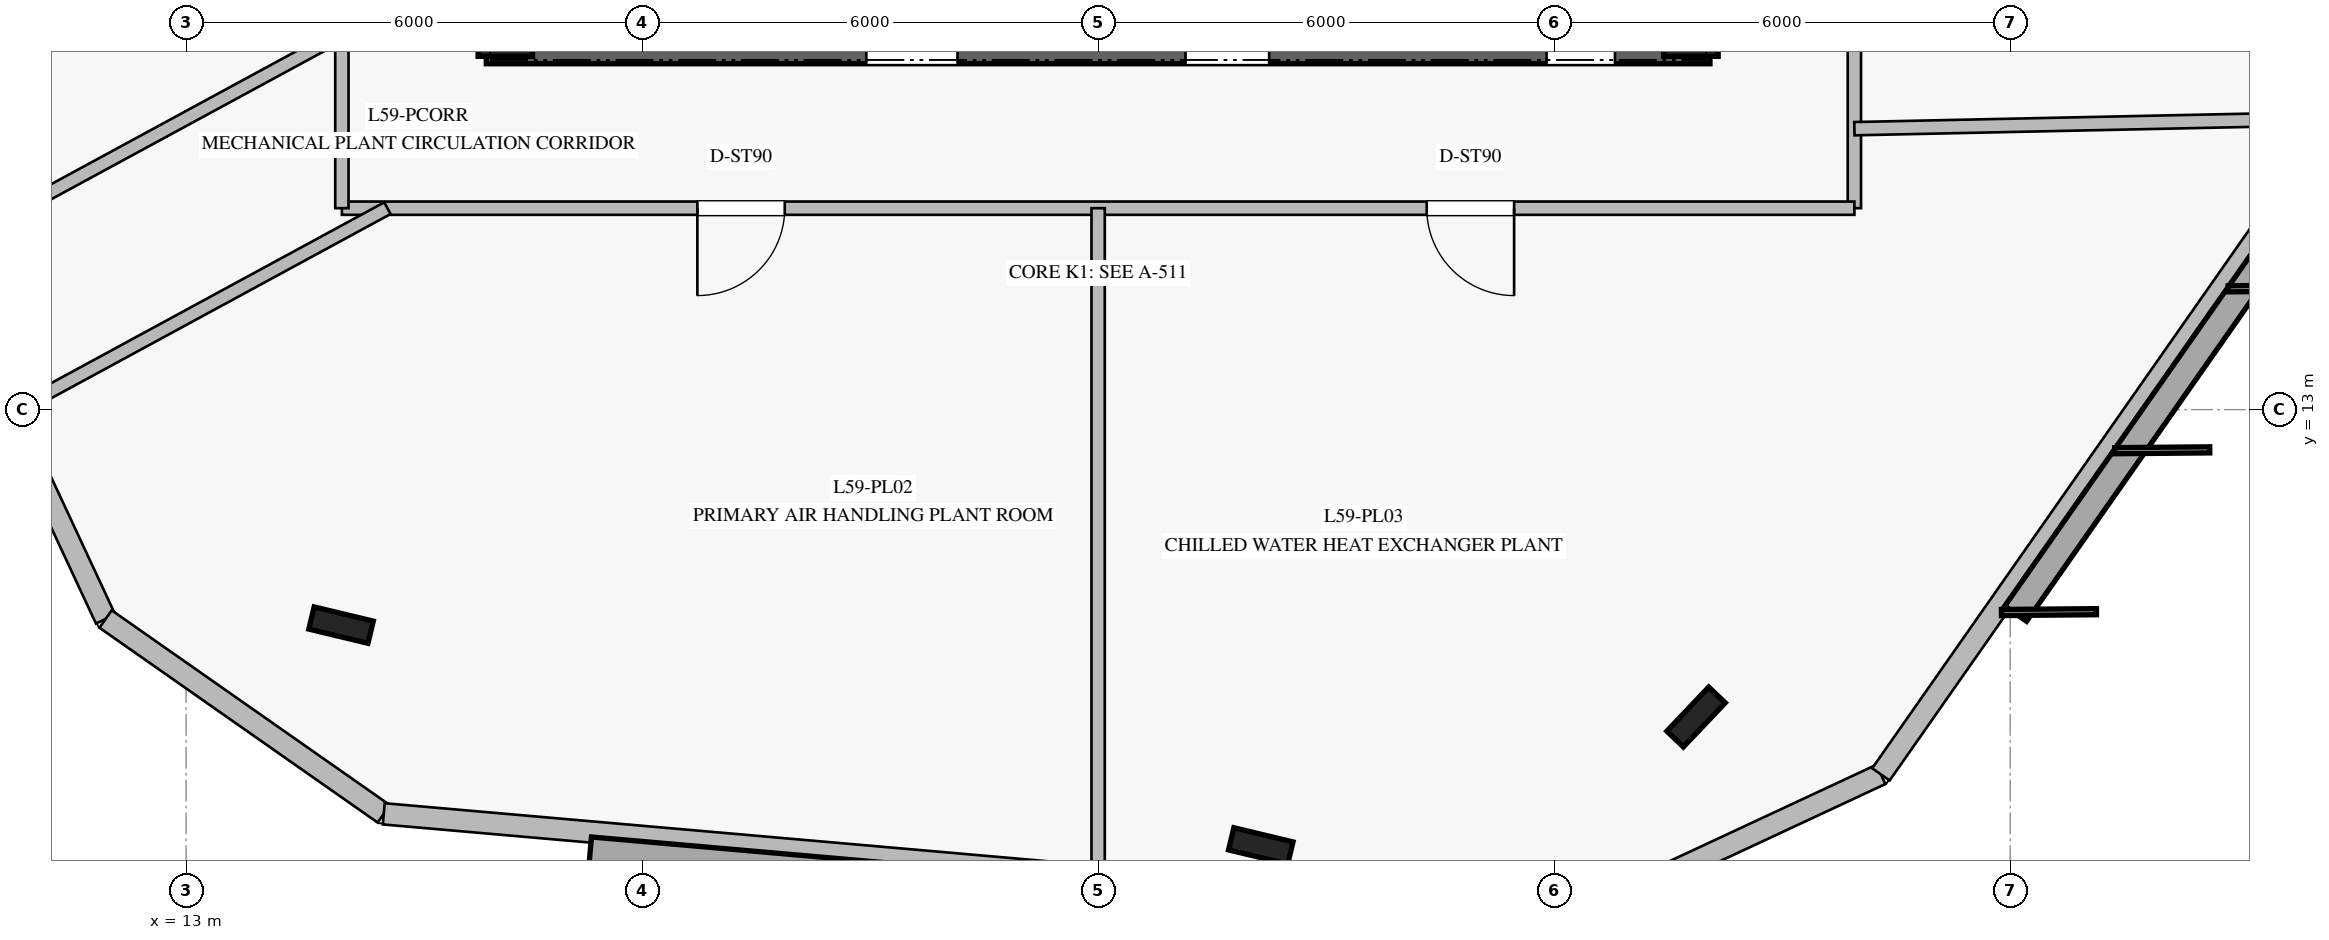
"""IFC4 building model, lengths in metres.
Left out: names, types, materials, properties, quantities, classifications, styles, units other than length and angle.
Written with IfcOpenShell. Run it as: python <this file> out.ifc"""

import sys

from ifc_helpers import new_model, si_unit, direction, frame, frame_2d, origin, origin_2d, place, context, subcontext, project, spatial, rectangle, i_section, extrude, element, fill, save


model = new_model("IFC4")
c1 = context("Model", 3, precision=1e-05, world=origin(), true_north=direction((0.0, 1.0)))
c2 = subcontext(c1, "Body", "Model", "MODEL_VIEW")
j1 = project(units=[si_unit("LENGTHUNIT", "METRE"), si_unit("PLANEANGLEUNIT", "RADIAN")], contexts=[c1])
p1 = place(None, origin())
s1 = spatial("IfcSite", under=j1, at=p1, CompositionType="ELEMENT")
p2 = place(p1, origin())
s2 = spatial("IfcBuilding", under=s1, at=p2, CompositionType="ELEMENT")
p3 = place(p2, frame((0.0, 0.0, 244.8)))
s3 = spatial("IfcBuildingStorey", under=s2, at=p3, CompositionType="ELEMENT", Elevation=244.8)
p4 = place(p3, frame((16.95, 17.8, 0.0), z_axis=(0.0, 0.0, 1.0), x_axis=(1.0, 0.0, 0.0)))
e1 = element("IfcWall", 1, at=p4, inside=s3, PredefinedType="SHEAR", context=c2, shape_type="SweptSolid", body=[
    extrude(rectangle(XDim=16.1, YDim=0.5, at=frame_2d((8.05, 0.0))), origin(), (0.0, 0.0, 1.0), 5.18),
])
p5 = place(p4, frame((5.0, 0.0, 0.0)))
e2 = element("IfcOpeningElement", 2, at=p5, cuts=e1, PredefinedType="OPENING", context=c2, shape_type="SweptSolid", body=[
    extrude(rectangle(XDim=1.2, YDim=2.25, at=frame_2d((0.6, 1.125))), frame((0.0, 0.26, 0.0), z_axis=(0.0, -1.0, 0.0), x_axis=(1.0, 0.0, 0.0)), (0.0, 0.0, 1.0), 0.52),
])
p6 = place(p4, frame((13.95, 0.0, 0.0)))
e3 = element("IfcOpeningElement", 3, at=p6, cuts=e1, PredefinedType="OPENING", context=c2, shape_type="SweptSolid", body=[
    extrude(rectangle(XDim=0.9, YDim=2.1, at=frame_2d((0.45, 1.05))), frame((0.0, 0.26, 0.0), z_axis=(0.0, -1.0, 0.0), x_axis=(1.0, 0.0, 0.0)), (0.0, 0.0, 1.0), 0.52),
])
p7 = place(p4, frame((9.2, 0.0, 0.0)))
e4 = element("IfcOpeningElement", 4, at=p7, cuts=e1, PredefinedType="OPENING", context=c2, shape_type="SweptSolid", body=[
    extrude(rectangle(XDim=1.1, YDim=2.2, at=frame_2d((0.55, 1.1))), frame((0.0, 0.26, 0.0), z_axis=(0.0, -1.0, 0.0), x_axis=(1.0, 0.0, 0.0)), (0.0, 0.0, 1.0), 0.52),
])
for number, where, z_axis, x_axis in (
    (5, (17.2, 17.8, 0.0), (0.0, 0.0, 1.0), (1.0, 0.0, 0.0)),
    (6, (32.8, 17.8, 0.0), (0.0, 0.0, 1.0), (1.0, 0.0, 0.0)),
):
    element("IfcColumn", number, at=place(p3, frame(where, z_axis=z_axis, x_axis=x_axis)), inside=s3, PredefinedType="COLUMN", context=c2, shape_type="SweptSolid", body=[
        extrude(i_section(OverallWidth=0.304, OverallDepth=0.716, WebThickness=0.021, FlangeThickness=0.04, at=origin_2d()), origin(), (0.0, 0.0, 1.0), 5.4),
    ])
for number, where, z_axis, x_axis in (
    (7, (15.039, 10.165, 0.0), (0.0, 0.0, 1.0), (-0.972, 0.233, 0.0)),
    (8, (27.14, 7.26, 0.0), (0.0, 0.0, 1.0), (-0.972, 0.233, 0.0)),
    (9, (32.867, 8.956, 0.0), (0.0, 0.0, 1.0), (0.688, 0.725, 0.0)),
):
    element("IfcColumn", number, at=place(p3, frame(where, z_axis=z_axis, x_axis=x_axis)), inside=s3, PredefinedType="COLUMN", context=c2, shape_type="SweptSolid", body=[
        extrude(i_section(OverallWidth=0.3, OverallDepth=0.8, WebThickness=0.018, FlangeThickness=0.033, at=origin_2d()), origin(), (0.0, 0.0, 1.0), 5.4),
    ])
p8 = place(p3, frame((5.302, 24.481, 0.0), z_axis=(0.0, 0.0, 1.0), x_axis=(0.422651460509, -0.906292305456, 0.0)))
e10 = element("IfcWall", 10, at=p8, inside=s3, PredefinedType="STANDARD", context=c2, shape_type="SweptSolid", body=[
    extrude(rectangle(XDim=15.708, YDim=0.28, at=frame_2d((7.854, 0.0))), origin(), (0.0, 0.0, 1.0), 5.18),
])
p9 = place(p3, frame((11.941, 10.245, 0.0), z_axis=(0.0, 0.0, 1.0), x_axis=(0.819113829151, -0.573631009355, 0.0)))
e11 = element("IfcWall", 11, at=p9, inside=s3, PredefinedType="STANDARD", context=c2, shape_type="SweptSolid", body=[
    extrude(rectangle(XDim=4.469, YDim=0.28, at=frame_2d((2.234, 0.0))), origin(), (0.0, 0.0, 1.0), 5.18),
])
p10 = place(p3, frame((15.601, 7.682, 0.0), z_axis=(0.0, 0.0, 1.0), x_axis=(0.996195370644, -0.087148055094, 0.0)))
e12 = element("IfcWall", 12, at=p10, inside=s3, PredefinedType="STANDARD", context=c2, shape_type="SweptSolid", body=[
    extrude(rectangle(XDim=15.708, YDim=0.28, at=frame_2d((7.854, 0.0))), origin(), (0.0, 0.0, 1.0), 5.18),
])
p11 = place(p3, frame((31.249, 6.313, 0.0), z_axis=(0.0, 0.0, 1.0), x_axis=(0.906361723837, 0.422502574624, 0.0)))
e13 = element("IfcWall", 13, at=p11, inside=s3, PredefinedType="STANDARD", context=c2, shape_type="SweptSolid", body=[
    extrude(rectangle(XDim=4.469, YDim=0.28, at=frame_2d((2.234, 0.0))), origin(), (0.0, 0.0, 1.0), 5.18),
])
p12 = place(p3, frame((35.299, 8.201, 0.0), z_axis=(0.0, 0.0, 1.0), x_axis=(0.573547879244, 0.819172039449, 0.0)))
e14 = element("IfcWall", 14, at=p12, inside=s3, PredefinedType="STANDARD", context=c2, shape_type="SweptSolid", body=[
    extrude(rectangle(XDim=15.708, YDim=0.28, at=frame_2d((7.854, 0.0))), origin(), (0.0, 0.0, 1.0), 5.18),
])
p13 = place(p3, frame((34.95, 34.35, 0.0), z_axis=(0.0, 0.0, 1.0), x_axis=(0.0, -1.0, 0.0)))
e15 = element("IfcWall", 15, at=p13, inside=s3, PredefinedType="PARTITIONING", context=c2, shape_type="SweptSolid", body=[
    extrude(rectangle(XDim=18.7, YDim=0.175, at=frame_2d((9.35, 0.0))), origin(), (0.0, 0.0, 1.0), 3.78),
])
p14 = place(p13, frame((8.137, 0.0, 0.0)))
e16 = element("IfcOpeningElement", 16, at=p14, cuts=e15, PredefinedType="OPENING", context=c2, shape_type="SweptSolid", body=[
    extrude(rectangle(XDim=1.15, YDim=2.2, at=frame_2d((0.575, 1.1))), frame((0.0, 0.098, 0.0), z_axis=(0.0, -1.0, 0.0), x_axis=(1.0, 0.0, 0.0)), (0.0, 0.0, 1.0), 0.195),
])
p15 = place(p3, frame((34.95, 15.65, 0.0), z_axis=(0.0, 0.0, 1.0), x_axis=(-1.0, 0.0, 0.0)))
e17 = element("IfcWall", 17, at=p15, inside=s3, PredefinedType="PARTITIONING", context=c2, shape_type="SweptSolid", body=[
    extrude(rectangle(XDim=19.9, YDim=0.175, at=frame_2d((9.95, 0.0))), origin(), (0.0, 0.0, 1.0), 3.78),
])
p16 = place(p15, frame((14.073, 0.0, 0.0)))
e18 = element("IfcOpeningElement", 18, at=p16, cuts=e17, PredefinedType="OPENING", context=c2, shape_type="SweptSolid", body=[
    extrude(rectangle(XDim=1.15, YDim=2.2, at=frame_2d((0.575, 1.1))), frame((0.0, 0.098, 0.0), z_axis=(0.0, -1.0, 0.0), x_axis=(1.0, 0.0, 0.0)), (0.0, 0.0, 1.0), 0.195),
])
p17 = place(p15, frame((4.477, 0.0, 0.0)))
e19 = element("IfcOpeningElement", 19, at=p17, cuts=e17, PredefinedType="OPENING", context=c2, shape_type="SweptSolid", body=[
    extrude(rectangle(XDim=1.15, YDim=2.2, at=frame_2d((0.575, 1.1))), frame((0.0, 0.098, 0.0), z_axis=(0.0, -1.0, 0.0), x_axis=(1.0, 0.0, 0.0)), (0.0, 0.0, 1.0), 0.195),
])
p18 = place(p3, frame((15.05, 15.65, 0.0), z_axis=(0.0, 0.0, 1.0), x_axis=(0.0, 1.0, 0.0)))
e20 = element("IfcWall", 20, at=p18, inside=s3, PredefinedType="PARTITIONING", context=c2, shape_type="SweptSolid", body=[
    extrude(rectangle(XDim=18.7, YDim=0.175, at=frame_2d((9.35, 0.0))), origin(), (0.0, 0.0, 1.0), 3.78),
])
p19 = place(p18, frame((8.113, 0.0, 0.0)))
e21 = element("IfcOpeningElement", 21, at=p19, cuts=e20, PredefinedType="OPENING", context=c2, shape_type="SweptSolid", body=[
    extrude(rectangle(XDim=1.2, YDim=2.25, at=frame_2d((0.6, 1.125))), frame((0.0, 0.098, 0.0), z_axis=(0.0, -1.0, 0.0), x_axis=(1.0, 0.0, 0.0)), (0.0, 0.0, 1.0), 0.195),
])
p20 = place(p3, frame((15.05, 17.942, 0.0), z_axis=(0.0, 0.0, 1.0), x_axis=(-0.878919599329, -0.476969954939, 0.0)))
e22 = element("IfcWall", 22, at=p20, inside=s3, PredefinedType="PARTITIONING", context=c2, shape_type="SweptSolid", body=[
    extrude(rectangle(XDim=6.011, YDim=0.175, at=frame_2d((3.005, 0.0))), origin(), (0.0, 0.0, 1.0), 3.78),
])
p21 = place(p3, frame((15.649, 15.65, 0.0), z_axis=(0.0, 0.0, 1.0), x_axis=(-0.878891138972, -0.477022395529, 0.0)))
e23 = element("IfcWall", 23, at=p21, inside=s3, PredefinedType="PARTITIONING", context=c2, shape_type="SweptSolid", body=[
    extrude(rectangle(XDim=5.584, YDim=0.175, at=frame_2d((2.792, 0.0))), origin(), (0.0, 0.0, 1.0), 3.78),
])
p22 = place(p3, frame((34.95, 16.696, 0.0), z_axis=(0.0, 0.0, 1.0), x_axis=(0.99977397531, 0.021260251479, 0.0)))
e24 = element("IfcWall", 24, at=p22, inside=s3, PredefinedType="PARTITIONING", context=c2, shape_type="SweptSolid", body=[
    extrude(rectangle(XDim=6.304, YDim=0.175, at=frame_2d((3.152, 0.0))), origin(), (0.0, 0.0, 1.0), 3.78),
])
p23 = place(p3, frame((25.0, 15.65, 0.0), z_axis=(0.0, 0.0, 1.0), x_axis=(0.0, -1.0, 0.0)))
e25 = element("IfcWall", 25, at=p23, inside=s3, PredefinedType="PARTITIONING", context=c2, shape_type="SweptSolid", body=[
    extrude(rectangle(XDim=8.719, YDim=0.175, at=frame_2d((4.359, 0.0))), origin(), (0.0, 0.0, 1.0), 3.78),
])
p24 = place(p16, origin())
e26 = element("IfcDoor", 26, at=p24, inside=s3, OperationType="SINGLE_SWING_RIGHT", PredefinedType="DOOR", context=c2, shape_type="SweptSolid", body=[
    extrude(rectangle(XDim=1.15, YDim=2.2, at=frame_2d((0.575, 1.1))), frame((0.0, 0.025, 0.0), z_axis=(0.0, -1.0, 0.0), x_axis=(1.0, 0.0, 0.0)), (0.0, 0.0, 1.0), 0.05),
])
fill(e18, e26)
p25 = place(p17, origin())
e27 = element("IfcDoor", 27, at=p25, inside=s3, OperationType="SINGLE_SWING_LEFT", PredefinedType="DOOR", context=c2, shape_type="SweptSolid", body=[
    extrude(rectangle(XDim=1.15, YDim=2.2, at=frame_2d((0.575, 1.1))), frame((0.0, 0.025, 0.0), z_axis=(0.0, -1.0, 0.0), x_axis=(1.0, 0.0, 0.0)), (0.0, 0.0, 1.0), 0.05),
])
fill(e19, e27)
save(model, sys.argv[1])
